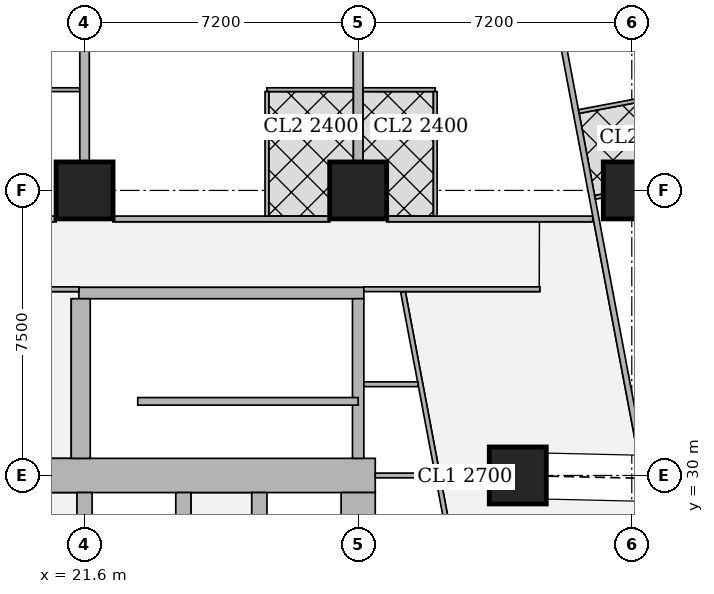
"""IFC4 building model, lengths in metres.
Left out: names, types, materials, properties, quantities, classifications, styles, units other than length and angle.
Written with IfcOpenShell. Run it as: python <this file> out.ifc"""

import sys

from ifc_helpers import new_model, si_unit, direction, frame, frame_2d, origin, origin_2d, place, context, subcontext, project, spatial, rectangle, extrude, element, fill, save


model = new_model("IFC4")
c1 = context("Model", 3, precision=1e-05, world=origin(), true_north=direction((0.0, 1.0)))
c2 = subcontext(c1, "Body", "Model", "MODEL_VIEW")
j1 = project(units=[si_unit("LENGTHUNIT", "METRE"), si_unit("PLANEANGLEUNIT", "RADIAN")], contexts=[c1])
p1 = place(None, origin())
s1 = spatial("IfcSite", under=j1, at=p1, CompositionType="ELEMENT")
p2 = place(p1, origin())
s2 = spatial("IfcBuilding", under=s1, at=p2, CompositionType="ELEMENT")
p3 = place(p2, frame((0.0, 0.0, 169.55)))
s3 = spatial("IfcBuildingStorey", under=s2, at=p3, CompositionType="ELEMENT", Elevation=169.55)
for number, where, z_axis, x_axis in (
    (1, (33.0, 30.0, 0.0), (0.0, 0.0, 1.0), (1.0, 0.0, 0.0)),
    (2, (21.6, 37.5, 0.0), (0.0, 0.0, 1.0), (1.0, 0.0, 0.0)),
    (3, (28.8, 37.5, 0.0), (0.0, 0.0, 1.0), (1.0, 0.0, 0.0)),
    (4, (36.0, 37.5, 0.0), (0.0, 0.0, 1.0), (1.0, 0.0, 0.0)),
):
    element("IfcColumn", number, at=place(p3, frame(where, z_axis=z_axis, x_axis=x_axis)), inside=s3, PredefinedType="COLUMN", context=c2, shape_type="SweptSolid", body=[
        extrude(rectangle(XDim=1.5, YDim=1.5, at=origin_2d()), origin(), (0.0, 0.0, 1.0), 3.75),
    ])
p4 = place(p3, frame((13.95, 30.0, 0.0), z_axis=(0.0, 0.0, 1.0), x_axis=(1.0, 0.0, 0.0)))
e5 = element("IfcWall", 5, at=p4, inside=s3, PredefinedType="SHEAR", context=c2, shape_type="SweptSolid", body=[
    extrude(rectangle(XDim=15.3, YDim=0.9, at=frame_2d((7.65, 0.0))), origin(), (0.0, 0.0, 1.0), 3.75),
])
p5 = place(p4, frame((4.45, 0.0, 0.0)))
e6 = element("IfcOpeningElement", 6, at=p5, cuts=e5, PredefinedType="OPENING", context=c2, shape_type="SweptSolid", body=[
    extrude(rectangle(XDim=1.8, YDim=2.1, at=frame_2d((0.9, 1.05))), frame((0.0, 0.46, 0.0), z_axis=(0.0, -1.0, 0.0), x_axis=(1.0, 0.0, 0.0)), (0.0, 0.0, 1.0), 0.92),
])
p6 = place(p4, frame((10.7, 0.0, 0.0)))
e7 = element("IfcOpeningElement", 7, at=p6, cuts=e5, PredefinedType="OPENING", context=c2, shape_type="SweptSolid", body=[
    extrude(rectangle(XDim=1.1, YDim=2.1, at=frame_2d((0.55, 1.05))), frame((0.0, 0.46, 0.0), z_axis=(0.0, -1.0, 0.0), x_axis=(1.0, 0.0, 0.0)), (0.0, 0.0, 1.0), 0.92),
])
p7 = place(p3, frame((28.8, 15.45, 0.0), z_axis=(0.0, 0.0, 1.0), x_axis=(0.0, 1.0, 0.0)))
e8 = element("IfcWall", 8, at=p7, inside=s3, PredefinedType="SHEAR", context=c2, shape_type="SweptSolid", body=[
    extrude(rectangle(XDim=14.1, YDim=0.9, at=frame_2d((7.05, 0.0))), origin(), (0.0, 0.0, 1.0), 3.75),
])
p8 = place(p3, frame((21.6, 15.45, 0.0), z_axis=(0.0, 0.0, 1.0), x_axis=(0.0, 1.0, 0.0)))
e9 = element("IfcWall", 9, at=p8, inside=s3, PredefinedType="SHEAR", context=c2, shape_type="SweptSolid", body=[
    extrude(rectangle(XDim=14.1, YDim=0.4, at=frame_2d((7.05, 0.0))), origin(), (0.0, 0.0, 1.0), 3.75),
])
p9 = place(p8, frame((0.875, 0.0, 0.0)))
e10 = element("IfcOpeningElement", 10, at=p9, cuts=e9, PredefinedType="OPENING", context=c2, shape_type="SweptSolid", body=[
    extrude(rectangle(XDim=1.1, YDim=2.1, at=frame_2d((0.55, 1.05))), frame((0.0, 0.21, 0.0), z_axis=(0.0, -1.0, 0.0), x_axis=(1.0, 0.0, 0.0)), (0.0, 0.0, 1.0), 0.42),
])
p10 = place(p8, frame((4.625, 0.0, 0.0)))
e11 = element("IfcOpeningElement", 11, at=p10, cuts=e9, PredefinedType="OPENING", context=c2, shape_type="SweptSolid", body=[
    extrude(rectangle(XDim=1.1, YDim=2.1, at=frame_2d((0.55, 1.05))), frame((0.0, 0.21, 0.0), z_axis=(0.0, -1.0, 0.0), x_axis=(1.0, 0.0, 0.0)), (0.0, 0.0, 1.0), 0.42),
])
p11 = place(p8, frame((8.375, 0.0, 0.0)))
e12 = element("IfcOpeningElement", 12, at=p11, cuts=e9, PredefinedType="OPENING", context=c2, shape_type="SweptSolid", body=[
    extrude(rectangle(XDim=1.1, YDim=2.1, at=frame_2d((0.55, 1.05))), frame((0.0, 0.21, 0.0), z_axis=(0.0, -1.0, 0.0), x_axis=(1.0, 0.0, 0.0)), (0.0, 0.0, 1.0), 0.42),
])
p12 = place(p8, frame((12.125, 0.0, 0.0)))
e13 = element("IfcOpeningElement", 13, at=p12, cuts=e9, PredefinedType="OPENING", context=c2, shape_type="SweptSolid", body=[
    extrude(rectangle(XDim=1.1, YDim=2.1, at=frame_2d((0.55, 1.05))), frame((0.0, 0.21, 0.0), z_axis=(0.0, -1.0, 0.0), x_axis=(1.0, 0.0, 0.0)), (0.0, 0.0, 1.0), 0.42),
])
p13 = place(p3, frame((24.2, 15.45, 0.0), z_axis=(0.0, 0.0, 1.0), x_axis=(0.0, 1.0, 0.0)))
e14 = element("IfcWall", 14, at=p13, inside=s3, PredefinedType="SHEAR", context=c2, shape_type="SweptSolid", body=[
    extrude(rectangle(XDim=14.1, YDim=0.4, at=frame_2d((7.05, 0.0))), origin(), (0.0, 0.0, 1.0), 3.75),
])
p14 = place(p3, frame((26.2, 26.45, 0.0), z_axis=(0.0, 0.0, 1.0), x_axis=(0.0, 1.0, 0.0)))
e15 = element("IfcWall", 15, at=p14, inside=s3, PredefinedType="SHEAR", context=c2, shape_type="SweptSolid", body=[
    extrude(rectangle(XDim=3.1, YDim=0.4, at=frame_2d((1.55, 0.0))), origin(), (0.0, 0.0, 1.0), 3.75),
])
p15 = place(p14, frame((1.075, 0.0, 0.0)))
e16 = element("IfcOpeningElement", 16, at=p15, cuts=e15, PredefinedType="OPENING", context=c2, shape_type="SweptSolid", body=[
    extrude(rectangle(XDim=1.2, YDim=2.1, at=frame_2d((0.6, 1.05))), frame((0.0, 0.21, 0.0), z_axis=(0.0, -1.0, 0.0), x_axis=(1.0, 0.0, 0.0)), (0.0, 0.0, 1.0), 0.42),
])
p16 = place(p3, frame((21.45, 34.8, 0.0), z_axis=(0.0, 0.0, 1.0), x_axis=(1.0, 0.0, 0.0)))
e17 = element("IfcWall", 17, at=p16, inside=s3, PredefinedType="SHEAR", context=c2, shape_type="SweptSolid", body=[
    extrude(rectangle(XDim=7.5, YDim=0.3, at=frame_2d((3.75, 0.0))), origin(), (0.0, 0.0, 1.0), 3.75),
])
p17 = place(p16, frame((0.5, 0.0, 0.0)))
e18 = element("IfcOpeningElement", 18, at=p17, cuts=e17, PredefinedType="OPENING", context=c2, shape_type="SweptSolid", body=[
    extrude(rectangle(XDim=1.1, YDim=2.1, at=frame_2d((0.55, 1.05))), frame((0.0, 0.16, 0.0), z_axis=(0.0, -1.0, 0.0), x_axis=(1.0, 0.0, 0.0)), (0.0, 0.0, 1.0), 0.32),
])
p18 = place(p3, frame((21.5, 30.45, 0.0), z_axis=(0.0, 0.0, 1.0), x_axis=(0.0, 1.0, 0.0)))
e19 = element("IfcWall", 19, at=p18, inside=s3, PredefinedType="SHEAR", context=c2, shape_type="SweptSolid", body=[
    extrude(rectangle(XDim=4.2, YDim=0.5, at=frame_2d((2.1, 0.0))), origin(), (0.0, 0.0, 1.0), 3.75),
])
p19 = place(p3, frame((28.8, 30.45, 0.0), z_axis=(0.0, 0.0, 1.0), x_axis=(0.0, 1.0, 0.0)))
e20 = element("IfcWall", 20, at=p19, inside=s3, PredefinedType="SHEAR", context=c2, shape_type="SweptSolid", body=[
    extrude(rectangle(XDim=4.2, YDim=0.3, at=frame_2d((2.1, 0.0))), origin(), (0.0, 0.0, 1.0), 3.75),
])
p20 = place(p3, frame((15.151, 36.75, 0.0), z_axis=(0.0, 0.0, 1.0), x_axis=(1.0, 0.0, 0.0)))
e21 = element("IfcWall", 21, at=p20, inside=s3, PredefinedType="SOLIDWALL", context=c2, shape_type="SweptSolid", body=[
    extrude(rectangle(XDim=5.698, YDim=0.15, at=frame_2d((2.849, 0.0))), origin(), (0.0, 0.0, 1.0), 3.5),
])
p21 = place(p3, frame((22.351, 36.75, 0.0), z_axis=(0.0, 0.0, 1.0), x_axis=(1.0, 0.0, 0.0)))
e22 = element("IfcWall", 22, at=p21, inside=s3, PredefinedType="SOLIDWALL", context=c2, shape_type="SweptSolid", body=[
    extrude(rectangle(XDim=5.698, YDim=0.15, at=frame_2d((2.849, 0.0))), origin(), (0.0, 0.0, 1.0), 3.5),
])
p22 = place(p21, frame((1.149, 0.0, 0.0)))
e23 = element("IfcOpeningElement", 23, at=p22, cuts=e22, PredefinedType="OPENING", context=c2, shape_type="SweptSolid", body=[
    extrude(rectangle(XDim=1.0, YDim=2.1, at=frame_2d((0.5, 1.05))), frame((0.0, 0.085, 0.0), z_axis=(0.0, -1.0, 0.0), x_axis=(1.0, 0.0, 0.0)), (0.0, 0.0, 1.0), 0.17),
])
p23 = place(p3, frame((29.551, 36.75, 0.0), z_axis=(0.0, 0.0, 1.0), x_axis=(1.0, 0.0, 0.0)))
e24 = element("IfcWall", 24, at=p23, inside=s3, PredefinedType="SOLIDWALL", context=c2, shape_type="SweptSolid", body=[
    extrude(rectangle(XDim=5.422, YDim=0.15, at=frame_2d((2.711, 0.0))), origin(), (0.0, 0.0, 1.0), 3.5),
])
p24 = place(p23, frame((2.895, 0.0, 0.0)))
e25 = element("IfcOpeningElement", 25, at=p24, cuts=e24, PredefinedType="OPENING", context=c2, shape_type="SweptSolid", body=[
    extrude(rectangle(XDim=1.0, YDim=2.1, at=frame_2d((0.5, 1.05))), frame((0.0, 0.085, 0.0), z_axis=(0.0, -1.0, 0.0), x_axis=(1.0, 0.0, 0.0)), (0.0, 0.0, 1.0), 0.17),
])
p25 = place(p3, frame((33.877, 43.029, 0.0), z_axis=(0.0, 0.0, 1.0), x_axis=(0.185596841028, -0.98262597798, 0.0)))
e26 = element("IfcWall", 26, at=p25, inside=s3, PredefinedType="SOLIDWALL", context=c2, shape_type="SweptSolid", body=[
    extrude(rectangle(XDim=41.66, YDim=0.15, at=frame_2d((20.83, 0.0))), origin(), (0.0, 0.0, 1.0), 2.5),
])
p26 = place(p25, frame((8.63, 0.0, 0.0)))
e27 = element("IfcOpeningElement", 27, at=p26, cuts=e26, PredefinedType="OPENING", context=c2, shape_type="SweptSolid", body=[
    extrude(rectangle(XDim=1.0, YDim=2.1, at=frame_2d((0.5, 1.05))), frame((0.0, 0.085, 0.0), z_axis=(0.0, -1.0, 0.0), x_axis=(1.0, 0.0, 0.0)), (0.0, 0.0, 1.0), 0.17),
])
p27 = place(p25, frame((13.841, 0.0, 0.0)))
e28 = element("IfcOpeningElement", 28, at=p27, cuts=e26, PredefinedType="OPENING", context=c2, shape_type="SweptSolid", body=[
    extrude(rectangle(XDim=1.0, YDim=2.1, at=frame_2d((0.5, 1.05))), frame((0.0, 0.085, 0.0), z_axis=(0.0, -1.0, 0.0), x_axis=(1.0, 0.0, 0.0)), (0.0, 0.0, 1.0), 0.17),
])
p28 = place(p25, frame((21.474, 0.0, 0.0)))
e29 = element("IfcOpeningElement", 29, at=p28, cuts=e26, PredefinedType="OPENING", context=c2, shape_type="SweptSolid", body=[
    extrude(rectangle(XDim=1.0, YDim=2.1, at=frame_2d((0.5, 1.05))), frame((0.0, 0.085, 0.0), z_axis=(0.0, -1.0, 0.0), x_axis=(1.0, 0.0, 0.0)), (0.0, 0.0, 1.0), 0.17),
])
p29 = place(p25, frame((30.4, 0.0, 0.0)))
e30 = element("IfcOpeningElement", 30, at=p29, cuts=e26, PredefinedType="OPENING", context=c2, shape_type="SweptSolid", body=[
    extrude(rectangle(XDim=1.0, YDim=2.1, at=frame_2d((0.5, 1.05))), frame((0.0, 0.085, 0.0), z_axis=(0.0, -1.0, 0.0), x_axis=(1.0, 0.0, 0.0)), (0.0, 0.0, 1.0), 0.17),
])
p30 = place(p25, frame((32.288, 0.0, 0.0)))
e31 = element("IfcOpeningElement", 31, at=p30, cuts=e26, PredefinedType="OPENING", context=c2, shape_type="SweptSolid", body=[
    extrude(rectangle(XDim=1.0, YDim=2.1, at=frame_2d((0.5, 1.05))), frame((0.0, 0.085, 0.0), z_axis=(0.0, -1.0, 0.0), x_axis=(1.0, 0.0, 0.0)), (0.0, 0.0, 1.0), 0.17),
])
p31 = place(p3, frame((37.823, 40.182, 0.0), z_axis=(0.0, 0.0, 1.0), x_axis=(-0.982664729897, -0.18539155487, 0.0)))
e32 = element("IfcWall", 32, at=p31, inside=s3, PredefinedType="PARTITIONING", context=c2, shape_type="SweptSolid", body=[
    extrude(rectangle(XDim=3.274, YDim=0.1, at=frame_2d((1.637, 0.0))), origin(), (0.0, 0.0, 1.0), 3.5),
])
p32 = place(p3, frame((35.24, 37.356, 0.0), z_axis=(0.0, 0.0, 1.0), x_axis=(-0.982819911474, -0.184567119526, 0.0)))
e33 = element("IfcWall", 33, at=p32, inside=s3, PredefinedType="PARTITIONING", context=c2, shape_type="SweptSolid", body=[
    extrude(rectangle(XDim=0.212, YDim=0.1, at=frame_2d((0.106, 0.0))), origin(), (0.0, 0.0, 1.0), 3.5),
])
p33 = place(p3, frame((14.4, 40.15, 0.0), z_axis=(0.0, 0.0, 1.0), x_axis=(1.0, 0.0, 0.0)))
e34 = element("IfcWall", 34, at=p33, inside=s3, PredefinedType="PARTITIONING", context=c2, shape_type="SweptSolid", body=[
    extrude(rectangle(XDim=7.075, YDim=0.1, at=frame_2d((3.538, 0.0))), origin(), (0.0, 0.0, 1.0), 3.5),
])
p34 = place(p33, frame((0.655, 0.0, 0.0)))
e35 = element("IfcOpeningElement", 35, at=p34, cuts=e34, PredefinedType="OPENING", context=c2, shape_type="SweptSolid", body=[
    extrude(rectangle(XDim=0.9, YDim=2.1, at=frame_2d((0.45, 1.05))), frame((0.0, 0.06, 0.0), z_axis=(0.0, -1.0, 0.0), x_axis=(1.0, 0.0, 0.0)), (0.0, 0.0, 1.0), 0.12),
])
p35 = place(p33, frame((5.55, 0.0, 0.0)))
e36 = element("IfcOpeningElement", 36, at=p35, cuts=e34, PredefinedType="OPENING", context=c2, shape_type="SweptSolid", body=[
    extrude(rectangle(XDim=0.9, YDim=2.1, at=frame_2d((0.45, 1.05))), frame((0.0, 0.06, 0.0), z_axis=(0.0, -1.0, 0.0), x_axis=(1.0, 0.0, 0.0)), (0.0, 0.0, 1.0), 0.12),
])
p36 = place(p33, frame((3.054, 0.0, 0.0)))
e37 = element("IfcOpeningElement", 37, at=p36, cuts=e34, PredefinedType="OPENING", context=c2, shape_type="SweptSolid", body=[
    extrude(rectangle(XDim=0.9, YDim=2.1, at=frame_2d((0.45, 1.05))), frame((0.0, 0.06, 0.0), z_axis=(0.0, -1.0, 0.0), x_axis=(1.0, 0.0, 0.0)), (0.0, 0.0, 1.0), 0.12),
])
p37 = place(p3, frame((26.399, 40.15, 0.0), z_axis=(0.0, 0.0, 1.0), x_axis=(1.0, 0.0, 0.0)))
e38 = element("IfcWall", 38, at=p37, inside=s3, PredefinedType="PARTITIONING", context=c2, shape_type="SweptSolid", body=[
    extrude(rectangle(XDim=2.276, YDim=0.1, at=frame_2d((1.138, 0.0))), origin(), (0.0, 0.0, 1.0), 3.5),
])
p38 = place(p37, frame((0.75, 0.0, 0.0)))
e39 = element("IfcOpeningElement", 39, at=p38, cuts=e38, PredefinedType="OPENING", context=c2, shape_type="SweptSolid", body=[
    extrude(rectangle(XDim=0.9, YDim=2.1, at=frame_2d((0.45, 1.05))), frame((0.0, 0.06, 0.0), z_axis=(0.0, -1.0, 0.0), x_axis=(1.0, 0.0, 0.0)), (0.0, 0.0, 1.0), 0.12),
])
p39 = place(p3, frame((26.399, 36.825, 0.0), z_axis=(0.0, 0.0, 1.0), x_axis=(0.0, 1.0, 0.0)))
e40 = element("IfcWall", 40, at=p39, inside=s3, PredefinedType="PARTITIONING", context=c2, shape_type="SweptSolid", body=[
    extrude(rectangle(XDim=3.275, YDim=0.1, at=frame_2d((1.638, 0.0))), origin(), (0.0, 0.0, 1.0), 3.5),
])
p40 = place(p3, frame((21.6, 38.251, 0.0), z_axis=(0.0, 0.0, 1.0), x_axis=(0.0, 1.0, 0.0)))
e41 = element("IfcWall", 41, at=p40, inside=s3, PredefinedType="SOLIDWALL", context=c2, shape_type="SweptSolid", body=[
    extrude(rectangle(XDim=3.099, YDim=0.25, at=frame_2d((1.55, 0.0))), origin(), (0.0, 0.0, 1.0), 3.5),
])
p41 = place(p3, frame((28.925, 40.15, 0.0), z_axis=(0.0, 0.0, 1.0), x_axis=(1.0, 0.0, 0.0)))
e42 = element("IfcWall", 42, at=p41, inside=s3, PredefinedType="PARTITIONING", context=c2, shape_type="SweptSolid", body=[
    extrude(rectangle(XDim=1.904, YDim=0.1, at=frame_2d((0.952, 0.0))), origin(), (0.0, 0.0, 1.0), 3.5),
])
p42 = place(p41, frame((0.425, 0.0, 0.0)))
e43 = element("IfcOpeningElement", 43, at=p42, cuts=e42, PredefinedType="OPENING", context=c2, shape_type="SweptSolid", body=[
    extrude(rectangle(XDim=0.9, YDim=2.1, at=frame_2d((0.45, 1.05))), frame((0.0, 0.06, 0.0), z_axis=(0.0, -1.0, 0.0), x_axis=(1.0, 0.0, 0.0)), (0.0, 0.0, 1.0), 0.12),
])
p43 = place(p3, frame((30.829, 36.825, 0.0), z_axis=(0.0, 0.0, 1.0), x_axis=(0.0, 1.0, 0.0)))
e44 = element("IfcWall", 44, at=p43, inside=s3, PredefinedType="PARTITIONING", context=c2, shape_type="SweptSolid", body=[
    extrude(rectangle(XDim=3.275, YDim=0.1, at=frame_2d((1.638, 0.0))), origin(), (0.0, 0.0, 1.0), 3.5),
])
p44 = place(p3, frame((28.8, 38.251, 0.0), z_axis=(0.0, 0.0, 1.0), x_axis=(0.0, 1.0, 0.0)))
e45 = element("IfcWall", 45, at=p44, inside=s3, PredefinedType="SOLIDWALL", context=c2, shape_type="SweptSolid", body=[
    extrude(rectangle(XDim=3.099, YDim=0.25, at=frame_2d((1.55, 0.0))), origin(), (0.0, 0.0, 1.0), 3.5),
])
p45 = place(p3, frame((13.95, 34.9, 0.0), z_axis=(0.0, 0.0, 1.0), x_axis=(1.0, 0.0, 0.0)))
e46 = element("IfcWall", 46, at=p45, inside=s3, PredefinedType="PARTITIONING", context=c2, shape_type="SweptSolid", body=[
    extrude(rectangle(XDim=7.5, YDim=0.125, at=frame_2d((3.75, 0.0))), origin(), (0.0, 0.0, 1.0), 3.5),
])
p46 = place(p45, frame((3.95, 0.0, 0.0)))
e47 = element("IfcOpeningElement", 47, at=p46, cuts=e46, PredefinedType="OPENING", context=c2, shape_type="SweptSolid", body=[
    extrude(rectangle(XDim=1.8, YDim=2.1, at=frame_2d((0.9, 1.05))), frame((0.0, 0.073, 0.0), z_axis=(0.0, -1.0, 0.0), x_axis=(1.0, 0.0, 0.0)), (0.0, 0.0, 1.0), 0.145),
])
p47 = place(p3, frame((28.95, 34.9, 0.0), z_axis=(0.0, 0.0, 1.0), x_axis=(1.0, 0.0, 0.0)))
e48 = element("IfcWall", 48, at=p47, inside=s3, PredefinedType="PARTITIONING", context=c2, shape_type="SweptSolid", body=[
    extrude(rectangle(XDim=4.63, YDim=0.125, at=frame_2d((2.315, 0.0))), origin(), (0.0, 0.0, 1.0), 3.5),
])
p48 = place(p3, frame((32.188, 23.141, 0.0), z_axis=(0.0, 0.0, 1.0), x_axis=(-0.185598625075, 0.98262564101, 0.0)))
e49 = element("IfcWall", 49, at=p48, inside=s3, PredefinedType="PARTITIONING", context=c2, shape_type="SweptSolid", body=[
    extrude(rectangle(XDim=11.891, YDim=0.125, at=frame_2d((5.946, 0.0))), origin(), (0.0, 0.0, 1.0), 3.5),
])
p49 = place(p48, frame((7.803, 0.0, 0.0)))
e50 = element("IfcOpeningElement", 50, at=p49, cuts=e49, PredefinedType="OPENING", context=c2, shape_type="SweptSolid", body=[
    extrude(rectangle(XDim=1.0, YDim=2.1, at=frame_2d((0.5, 1.05))), frame((0.0, 0.073, 0.0), z_axis=(0.0, -1.0, 0.0), x_axis=(1.0, 0.0, 0.0)), (0.0, 0.0, 1.0), 0.145),
])
p50 = place(p48, frame((10.246, 0.0, 0.0)))
e51 = element("IfcOpeningElement", 51, at=p50, cuts=e49, PredefinedType="OPENING", context=c2, shape_type="SweptSolid", body=[
    extrude(rectangle(XDim=1.0, YDim=2.1, at=frame_2d((0.5, 1.05))), frame((0.0, 0.073, 0.0), z_axis=(0.0, -1.0, 0.0), x_axis=(1.0, 0.0, 0.0)), (0.0, 0.0, 1.0), 0.145),
])
p51 = place(p3, frame((29.25, 30.0, 0.0), z_axis=(0.0, 0.0, 1.0), x_axis=(1.0, 0.0, 0.0)))
e52 = element("IfcWall", 52, at=p51, inside=s3, PredefinedType="PARTITIONING", context=c2, shape_type="SweptSolid", body=[
    extrude(rectangle(XDim=1.579, YDim=0.125, at=frame_2d((0.79, 0.0))), origin(), (0.0, 0.0, 1.0), 3.5),
])
p52 = place(p3, frame((28.95, 32.4, 0.0), z_axis=(0.0, 0.0, 1.0), x_axis=(1.0, 0.0, 0.0)))
e53 = element("IfcWall", 53, at=p52, inside=s3, PredefinedType="PARTITIONING", context=c2, shape_type="SweptSolid", body=[
    extrude(rectangle(XDim=1.426, YDim=0.125, at=frame_2d((0.713, 0.0))), origin(), (0.0, 0.0, 1.0), 3.5),
])
p53 = place(p3, frame((23.0, 31.95, 0.0), z_axis=(0.0, 0.0, 1.0), x_axis=(1.0, 0.0, 0.0)))
e54 = element("IfcWall", 54, at=p53, inside=s3, PredefinedType="SHEAR", context=c2, shape_type="SweptSolid", body=[
    extrude(rectangle(XDim=5.8, YDim=0.2, at=frame_2d((2.9, 0.0))), origin(), (0.0, 0.0, 1.0), 3.75),
])
p54 = place(p26, origin())
e55 = element("IfcDoor", 55, at=p54, inside=s3, OperationType="SINGLE_SWING_RIGHT", PredefinedType="DOOR", context=c2, shape_type="SweptSolid", body=[
    extrude(rectangle(XDim=1.0, YDim=2.1, at=frame_2d((0.5, 1.05))), frame((0.0, 0.025, 0.0), z_axis=(0.0, -1.0, 0.0), x_axis=(1.0, 0.0, 0.0)), (0.0, 0.0, 1.0), 0.05),
])
fill(e27, e55)
p55 = place(p35, origin())
e56 = element("IfcDoor", 56, at=p55, inside=s3, OperationType="SINGLE_SWING_LEFT", PredefinedType="DOOR", context=c2, shape_type="SweptSolid", body=[
    extrude(rectangle(XDim=0.9, YDim=2.1, at=frame_2d((0.45, 1.05))), frame((0.0, 0.025, 0.0), z_axis=(0.0, -1.0, 0.0), x_axis=(1.0, 0.0, 0.0)), (0.0, 0.0, 1.0), 0.05),
])
fill(e36, e56)
p56 = place(p38, origin())
e57 = element("IfcDoor", 57, at=p56, inside=s3, OperationType="SINGLE_SWING_LEFT", PredefinedType="DOOR", context=c2, shape_type="SweptSolid", body=[
    extrude(rectangle(XDim=0.9, YDim=2.1, at=frame_2d((0.45, 1.05))), frame((0.0, 0.025, 0.0), z_axis=(0.0, -1.0, 0.0), x_axis=(1.0, 0.0, 0.0)), (0.0, 0.0, 1.0), 0.05),
])
fill(e39, e57)
p57 = place(p22, origin())
e58 = element("IfcDoor", 58, at=p57, inside=s3, OperationType="SINGLE_SWING_LEFT", PredefinedType="DOOR", context=c2, shape_type="SweptSolid", body=[
    extrude(rectangle(XDim=1.0, YDim=2.1, at=frame_2d((0.5, 1.05))), frame((0.0, 0.025, 0.0), z_axis=(0.0, -1.0, 0.0), x_axis=(1.0, 0.0, 0.0)), (0.0, 0.0, 1.0), 0.05),
])
fill(e23, e58)
p58 = place(p42, origin())
e59 = element("IfcDoor", 59, at=p58, inside=s3, OperationType="SINGLE_SWING_RIGHT", PredefinedType="DOOR", context=c2, shape_type="SweptSolid", body=[
    extrude(rectangle(XDim=0.9, YDim=2.1, at=frame_2d((0.45, 1.05))), frame((0.0, 0.025, 0.0), z_axis=(0.0, -1.0, 0.0), x_axis=(1.0, 0.0, 0.0)), (0.0, 0.0, 1.0), 0.05),
])
fill(e43, e59)
p59 = place(p24, origin())
e60 = element("IfcDoor", 60, at=p59, inside=s3, OperationType="SINGLE_SWING_RIGHT", PredefinedType="DOOR", context=c2, shape_type="SweptSolid", body=[
    extrude(rectangle(XDim=1.0, YDim=2.1, at=frame_2d((0.5, 1.05))), frame((0.0, 0.025, 0.0), z_axis=(0.0, -1.0, 0.0), x_axis=(1.0, 0.0, 0.0)), (0.0, 0.0, 1.0), 0.05),
])
fill(e25, e60)
p60 = place(p49, origin())
e61 = element("IfcDoor", 61, at=p60, inside=s3, OperationType="SINGLE_SWING_RIGHT", PredefinedType="DOOR", context=c2, shape_type="SweptSolid", body=[
    extrude(rectangle(XDim=1.0, YDim=2.1, at=frame_2d((0.5, 1.05))), frame((0.0, 0.025, 0.0), z_axis=(0.0, -1.0, 0.0), x_axis=(1.0, 0.0, 0.0)), (0.0, 0.0, 1.0), 0.05),
])
fill(e50, e61)
p61 = place(p50, origin())
e62 = element("IfcDoor", 62, at=p61, inside=s3, OperationType="SINGLE_SWING_RIGHT", PredefinedType="DOOR", context=c2, shape_type="SweptSolid", body=[
    extrude(rectangle(XDim=1.0, YDim=2.1, at=frame_2d((0.5, 1.05))), frame((0.0, 0.025, 0.0), z_axis=(0.0, -1.0, 0.0), x_axis=(1.0, 0.0, 0.0)), (0.0, 0.0, 1.0), 0.05),
])
fill(e51, e62)
p62 = place(p6, origin())
e63 = element("IfcDoor", 63, at=p62, inside=s3, OperationType="SINGLE_SWING_RIGHT", PredefinedType="DOOR", context=c2, shape_type="SweptSolid", body=[
    extrude(rectangle(XDim=1.1, YDim=2.1, at=frame_2d((0.55, 1.05))), frame((0.0, 0.025, 0.0), z_axis=(0.0, -1.0, 0.0), x_axis=(1.0, 0.0, 0.0)), (0.0, 0.0, 1.0), 0.05),
])
fill(e7, e63)
p63 = place(p17, origin())
e64 = element("IfcDoor", 64, at=p63, inside=s3, OperationType="SINGLE_SWING_RIGHT", PredefinedType="DOOR", context=c2, shape_type="SweptSolid", body=[
    extrude(rectangle(XDim=1.1, YDim=2.1, at=frame_2d((0.55, 1.05))), frame((0.0, 0.025, 0.0), z_axis=(0.0, -1.0, 0.0), x_axis=(1.0, 0.0, 0.0)), (0.0, 0.0, 1.0), 0.05),
])
fill(e18, e64)
save(model, sys.argv[1])
